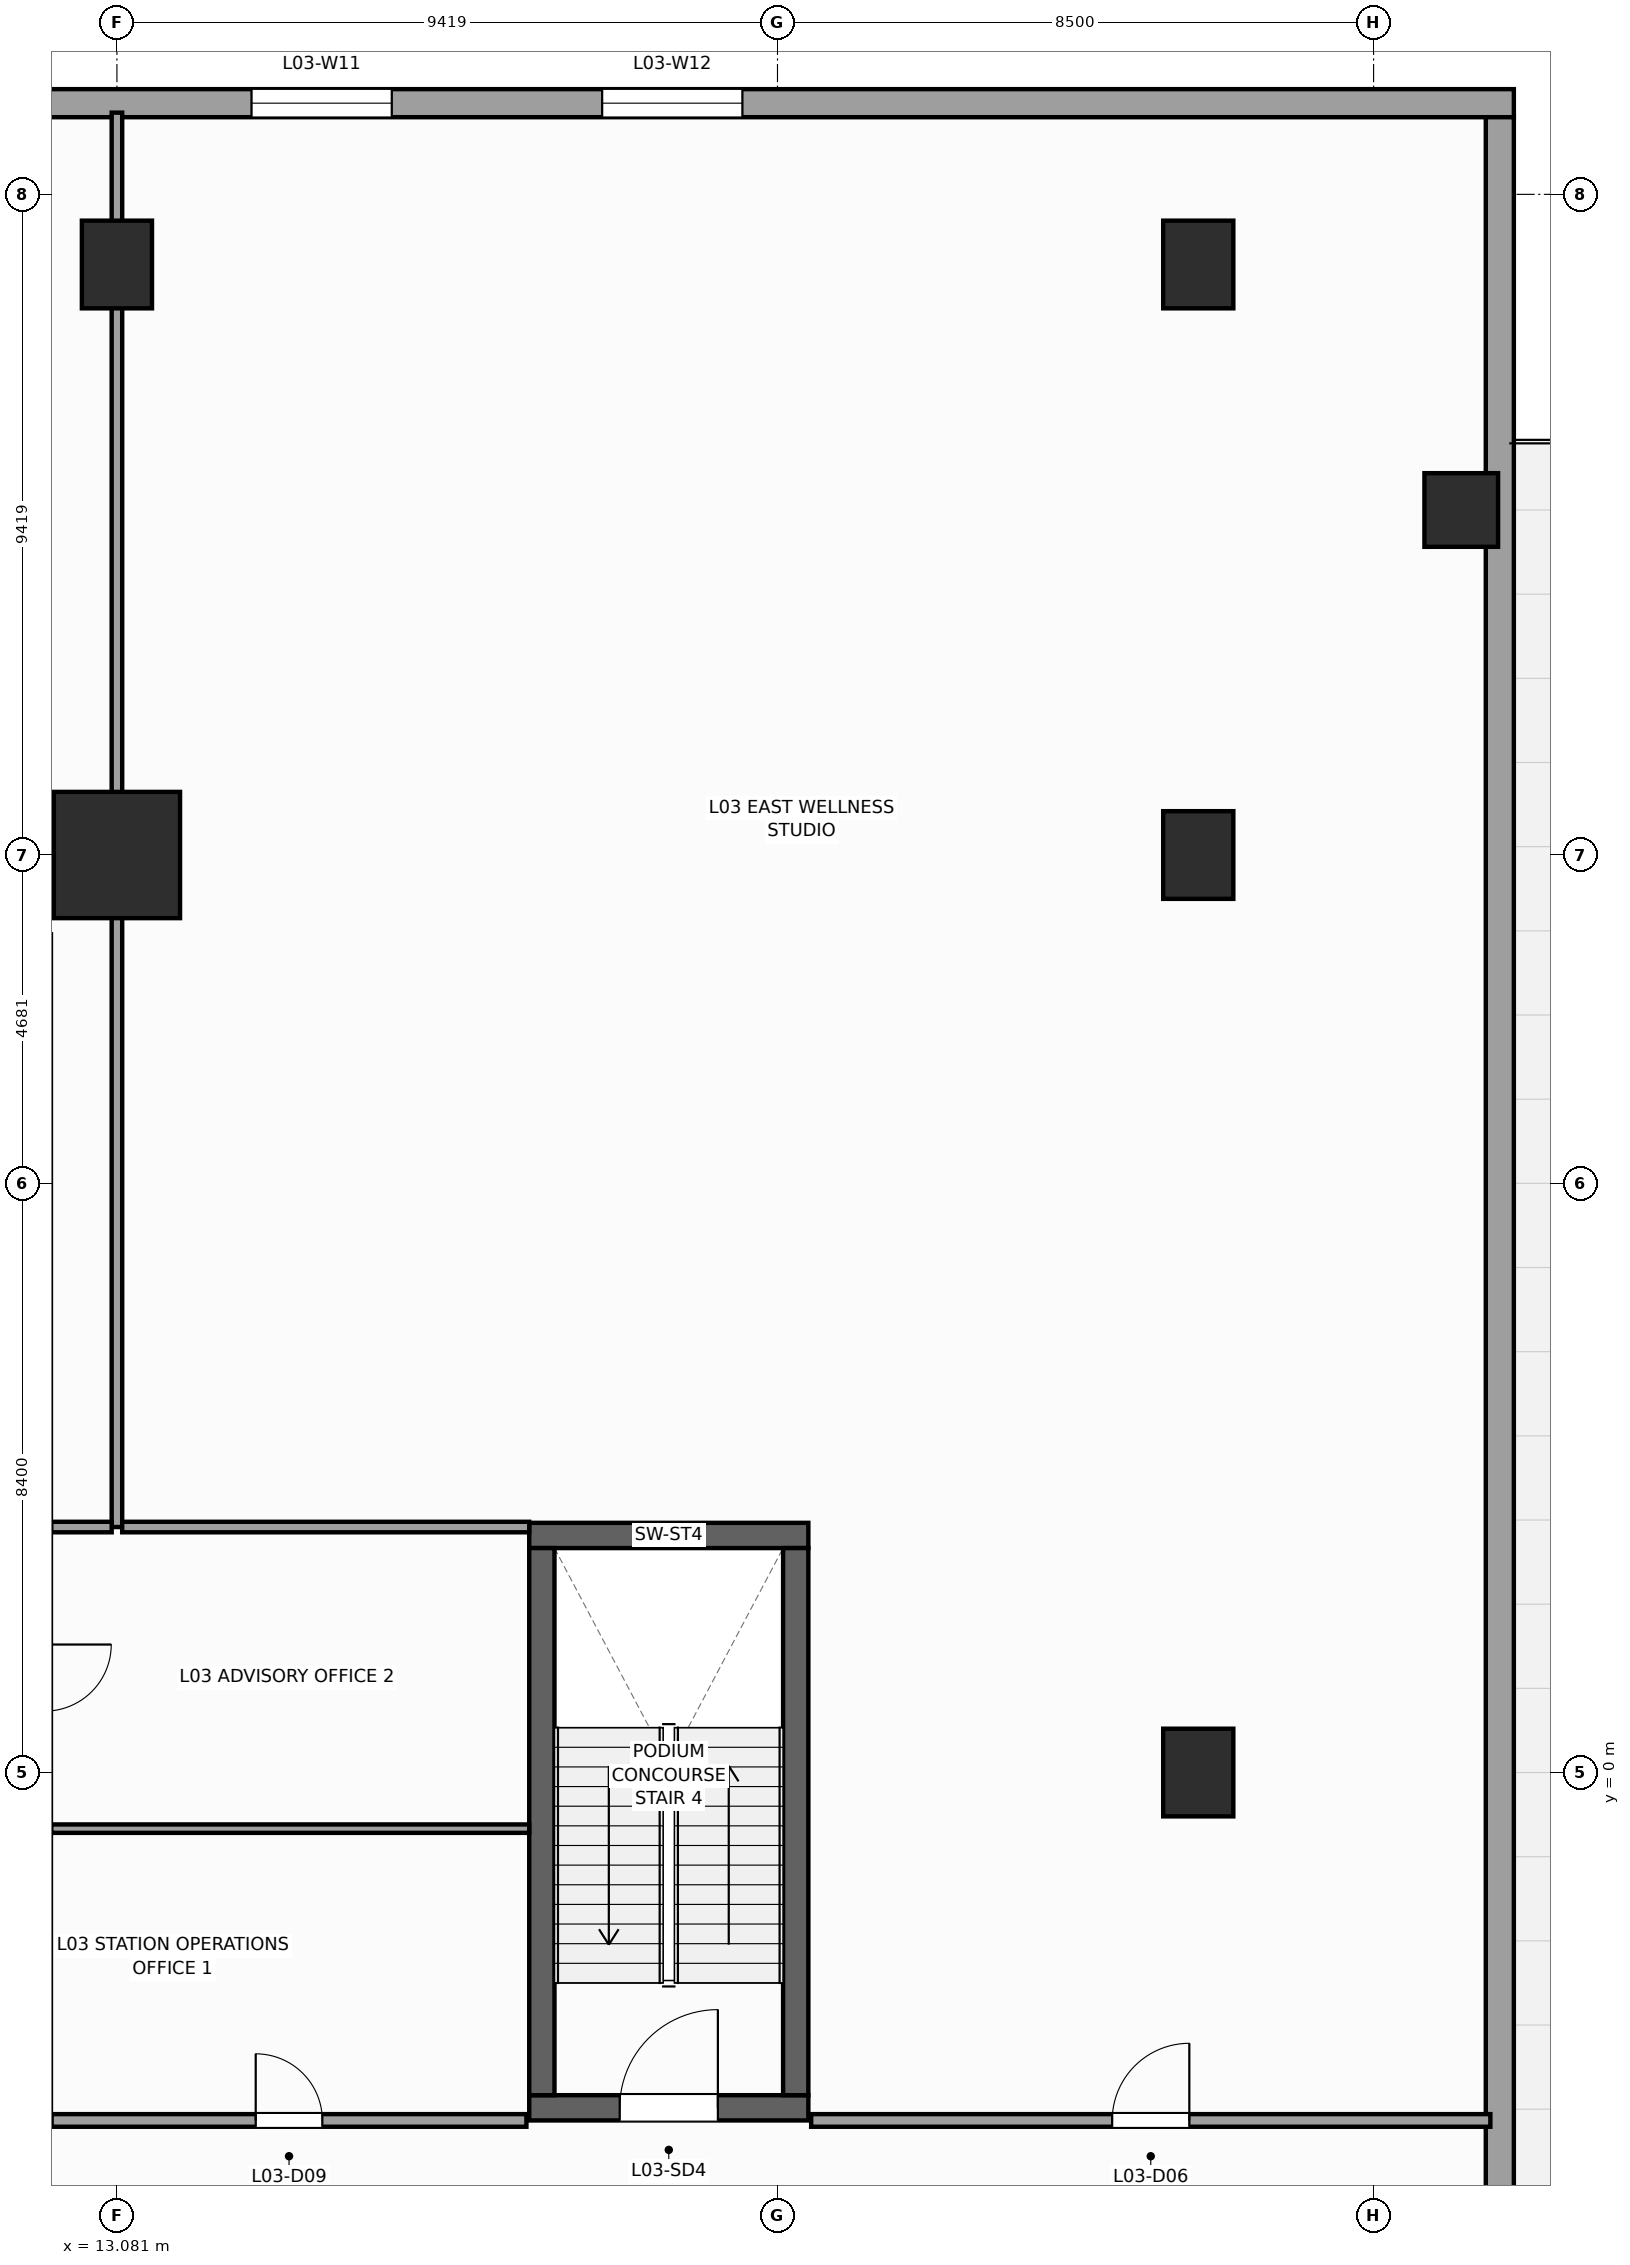
"""IFC4 building model, lengths in metres.
Left out: names, types, materials, properties, quantities, classifications, styles, units other than length and angle.
Written with IfcOpenShell. Run it as: python <this file> out.ifc"""

import sys

from ifc_helpers import new_model, si_unit, direction, frame, frame_2d, origin, origin_2d, place, context, subcontext, project, spatial, rectangle, extrude, source, transform, mapped, element, fill, save


model = new_model("IFC4")
c1 = context("Model", 3, precision=1e-05, world=origin(), true_north=direction((0.0, 1.0)))
c2 = subcontext(c1, "Body", "Model", "MODEL_VIEW")
j1 = project(units=[si_unit("LENGTHUNIT", "METRE"), si_unit("PLANEANGLEUNIT", "RADIAN")], contexts=[c1])
p1 = place(None, origin())
s1 = spatial("IfcSite", under=j1, at=p1, CompositionType="ELEMENT")
p2 = place(p1, origin())
s2 = spatial("IfcBuilding", under=s1, at=p2, CompositionType="ELEMENT")
p3 = place(p2, frame((0.0, 0.0, 16.0)))
s3 = spatial("IfcBuildingStorey", under=s2, at=p3, CompositionType="ELEMENT", Elevation=16.0)
p4 = place(p3, frame((18.96, -4.78, 0.0), z_axis=(0.0, 0.0, 1.0), x_axis=(1.0, 0.0, 0.0)))
e1 = element("IfcWall", 1, at=p4, inside=s3, PredefinedType="SHEAR", context=c2, shape_type="SweptSolid", body=[
    extrude(rectangle(XDim=3.98, YDim=0.36, at=frame_2d((1.99, 0.0))), origin(), (0.0, 0.0, 1.0), 5.0),
])
p5 = place(p4, frame((1.29, 0.0, 0.0)))
e2 = element("IfcOpeningElement", 2, at=p5, cuts=e1, PredefinedType="OPENING", context=c2, shape_type="SweptSolid", body=[
    extrude(rectangle(XDim=1.4, YDim=2.2, at=frame_2d((0.7, 1.1))), frame((0.0, 0.19, 0.0), z_axis=(0.0, -1.0, 0.0), x_axis=(1.0, 0.0, 0.0)), (0.0, 0.0, 1.0), 0.38),
])
p6 = place(p3, frame((18.96, 3.38, 0.0), z_axis=(0.0, 0.0, 1.0), x_axis=(1.0, 0.0, 0.0)))
e3 = element("IfcWall", 3, at=p6, inside=s3, PredefinedType="SHEAR", context=c2, shape_type="SweptSolid", body=[
    extrude(rectangle(XDim=3.98, YDim=0.36, at=frame_2d((1.99, 0.0))), origin(), (0.0, 0.0, 1.0), 5.0),
])
for number, where, z_axis, x_axis in (
    (4, (19.14, -4.6, 0.0), (0.0, 0.0, 1.0), (0.0, 1.0, 0.0)),
    (5, (22.76, -4.6, 0.0), (0.0, 0.0, 1.0), (0.0, 1.0, 0.0)),
):
    element("IfcWall", number, at=place(p3, frame(where, z_axis=z_axis, x_axis=x_axis)), inside=s3, PredefinedType="SHEAR", context=c2, shape_type="SweptSolid", body=[
        extrude(rectangle(XDim=7.8, YDim=0.36, at=frame_2d((3.9, 0.0))), origin(), (0.0, 0.0, 1.0), 5.0),
    ])
m1 = source(origin(), c2, "Body", "SweptSolid", [
    extrude(rectangle(XDim=1.8, YDim=1.8, at=origin_2d()), origin(), (0.0, 0.0, 1.0), 5.0),
])
p7 = place(p3, frame((13.081, 13.081, 0.0), z_axis=(0.0, 0.0, 1.0), x_axis=(1.0, 0.0, 0.0)))
e6 = element("IfcColumn", 6, at=p7, inside=s3, PredefinedType="COLUMN", context=c2, shape_type="MappedRepresentation", body=[
    mapped(m1, transform((0.0, 0.0, 0.0), scale=1.0)),
])
m2 = source(origin(), c2, "Body", "SweptSolid", [
    extrude(rectangle(XDim=1.0, YDim=1.25, at=origin_2d()), origin(), (0.0, 0.0, 1.0), 5.0),
])
for number, where, z_axis, x_axis in (
    (7, (13.081, 21.5, 0.0), (0.0, 0.0, 1.0), (1.0, 0.0, 0.0)),
    (8, (28.5, 21.5, 0.0), (0.0, 0.0, 1.0), (1.0, 0.0, 0.0)),
    (9, (28.5, 0.0, 0.0), (0.0, 0.0, 1.0), (1.0, 0.0, 0.0)),
    (10, (28.5, 13.081, 0.0), (0.0, 0.0, 1.0), (1.0, 0.0, 0.0)),
):
    element("IfcColumn", number, at=place(p3, frame(where, z_axis=z_axis, x_axis=x_axis)), inside=s3, PredefinedType="COLUMN", context=c2, shape_type="MappedRepresentation", body=[
        mapped(m2, transform((0.0, 0.0, 0.0), scale=1.0)),
    ])
m3 = source(origin(), c2, "Body", "SweptSolid", [
    extrude(rectangle(XDim=1.05, YDim=1.05, at=origin_2d()), origin(), (0.0, 0.0, 1.0), 5.0),
])
p8 = place(p3, frame((32.25, 18.0, 0.0), z_axis=(0.0, 0.0, 1.0), x_axis=(1.0, 0.0, 0.0)))
e11 = element("IfcColumn", 11, at=p8, inside=s3, PredefinedType="COLUMN", context=c2, shape_type="MappedRepresentation", body=[
    mapped(m3, transform((0.0, 0.0, 0.0), scale=1.0)),
])
p9 = place(p3, frame((1.5, 23.8, 0.0), z_axis=(0.0, 0.0, 1.0), x_axis=(1.0, 0.0, 0.0)))
e12 = element("IfcWall", 12, at=p9, inside=s3, PredefinedType="STANDARD", context=c2, shape_type="SweptSolid", body=[
    extrude(rectangle(XDim=31.5, YDim=0.4, at=frame_2d((15.75, 0.0))), origin(), (0.0, 0.0, 1.0), 4.66),
])
p10 = place(p9, frame((8.0, 0.0, 0.85)))
e13 = element("IfcOpeningElement", 13, at=p10, cuts=e12, PredefinedType="OPENING", context=c2, shape_type="SweptSolid", body=[
    extrude(rectangle(XDim=2.0, YDim=2.8, at=frame_2d((1.0, 1.4))), frame((0.0, 0.21, 0.0), z_axis=(0.0, -1.0, 0.0), x_axis=(1.0, 0.0, 0.0)), (0.0, 0.0, 1.0), 0.42),
])
p11 = place(p9, frame((13.5, 0.0, 0.85)))
e14 = element("IfcOpeningElement", 14, at=p11, cuts=e12, PredefinedType="OPENING", context=c2, shape_type="SweptSolid", body=[
    extrude(rectangle(XDim=2.0, YDim=2.8, at=frame_2d((1.0, 1.4))), frame((0.0, 0.21, 0.0), z_axis=(0.0, -1.0, 0.0), x_axis=(1.0, 0.0, 0.0)), (0.0, 0.0, 1.0), 0.42),
])
p12 = place(p9, frame((18.5, 0.0, 0.85)))
e15 = element("IfcOpeningElement", 15, at=p12, cuts=e12, PredefinedType="OPENING", context=c2, shape_type="SweptSolid", body=[
    extrude(rectangle(XDim=2.0, YDim=2.8, at=frame_2d((1.0, 1.4))), frame((0.0, 0.21, 0.0), z_axis=(0.0, -1.0, 0.0), x_axis=(1.0, 0.0, 0.0)), (0.0, 0.0, 1.0), 0.42),
])
p13 = place(p3, frame((32.8, -23.6, 0.0), z_axis=(0.0, 0.0, 1.0), x_axis=(0.0, 1.0, 0.0)))
e16 = element("IfcWall", 16, at=p13, inside=s3, PredefinedType="STANDARD", context=c2, shape_type="SweptSolid", body=[
    extrude(rectangle(XDim=47.2, YDim=0.4, at=frame_2d((23.6, 0.0))), origin(), (0.0, 0.0, 1.0), 4.66),
])
p14 = place(p13, frame((14.5, 0.0, 0.0)))
e17 = element("IfcOpeningElement", 17, at=p14, cuts=e16, PredefinedType="OPENING", context=c2, shape_type="SweptSolid", body=[
    extrude(rectangle(XDim=1.2, YDim=2.3, at=frame_2d((0.6, 1.15))), frame((0.0, 0.21, 0.0), z_axis=(0.0, -1.0, 0.0), x_axis=(1.0, 0.0, 0.0)), (0.0, 0.0, 1.0), 0.42),
])
p15 = place(p3, frame((12.15, -4.96, 0.0), z_axis=(0.0, 0.0, 1.0), x_axis=(1.0, 0.0, 0.0)))
e18 = element("IfcWall", 18, at=p15, inside=s3, PredefinedType="PARTITIONING", context=c2, shape_type="SweptSolid", body=[
    extrude(rectangle(XDim=6.77, YDim=0.18, at=frame_2d((3.385, 0.0))), origin(), (0.0, 0.0, 1.0), 4.66),
])
p16 = place(p15, frame((2.91, 0.0, 0.0)))
e19 = element("IfcOpeningElement", 19, at=p16, cuts=e18, PredefinedType="OPENING", context=c2, shape_type="SweptSolid", body=[
    extrude(rectangle(XDim=0.95, YDim=2.15, at=frame_2d((0.475, 1.075))), frame((0.0, 0.1, 0.0), z_axis=(0.0, -1.0, 0.0), x_axis=(1.0, 0.0, 0.0)), (0.0, 0.0, 1.0), 0.2),
])
p17 = place(p3, frame((22.98, -4.96, 0.0), z_axis=(0.0, 0.0, 1.0), x_axis=(1.0, 0.0, 0.0)))
e20 = element("IfcWall", 20, at=p17, inside=s3, PredefinedType="PARTITIONING", context=c2, shape_type="SweptSolid", body=[
    extrude(rectangle(XDim=9.685, YDim=0.18, at=frame_2d((4.843, 0.0))), origin(), (0.0, 0.0, 1.0), 4.66),
])
p18 = place(p17, frame((4.292, 0.0, 0.0)))
e21 = element("IfcOpeningElement", 21, at=p18, cuts=e20, PredefinedType="OPENING", context=c2, shape_type="SweptSolid", body=[
    extrude(rectangle(XDim=1.1, YDim=2.2, at=frame_2d((0.55, 1.1))), frame((0.0, 0.1, 0.0), z_axis=(0.0, -1.0, 0.0), x_axis=(1.0, 0.0, 0.0)), (0.0, 0.0, 1.0), 0.2),
])
p19 = place(p3, frame((13.081, 3.5, 0.0), z_axis=(0.0, 0.0, 1.0), x_axis=(0.0, 1.0, 0.0)))
e22 = element("IfcWall", 22, at=p19, inside=s3, PredefinedType="PARTITIONING", context=c2, shape_type="SweptSolid", body=[
    extrude(rectangle(XDim=20.165, YDim=0.15, at=frame_2d((10.083, 0.0))), origin(), (0.0, 0.0, 1.0), 3.652),
])
p20 = place(p3, frame((12.145, 3.5, 0.0), z_axis=(0.0, 0.0, 1.0), x_axis=(1.0, 0.0, 0.0)))
e23 = element("IfcWall", 23, at=p20, inside=s3, PredefinedType="PARTITIONING", context=c2, shape_type="SweptSolid", body=[
    extrude(rectangle(XDim=0.861, YDim=0.15, at=frame_2d((0.431, 0.0))), origin(), (0.0, 0.0, 1.0), 4.66),
])
p21 = place(p3, frame((13.156, 3.5, 0.0), z_axis=(0.0, 0.0, 1.0), x_axis=(1.0, 0.0, 0.0)))
e24 = element("IfcWall", 24, at=p21, inside=s3, PredefinedType="PARTITIONING", context=c2, shape_type="SweptSolid", body=[
    extrude(rectangle(XDim=5.804, YDim=0.15, at=frame_2d((2.902, 0.0))), origin(), (0.0, 0.0, 1.0), 4.66),
])
p22 = place(p3, frame((12.145, -0.8, 0.0), z_axis=(0.0, 0.0, 1.0), x_axis=(1.0, 0.0, 0.0)))
e25 = element("IfcWall", 25, at=p22, inside=s3, PredefinedType="PARTITIONING", context=c2, shape_type="SweptSolid", body=[
    extrude(rectangle(XDim=6.815, YDim=0.12, at=frame_2d((3.407, 0.0))), origin(), (0.0, 0.0, 1.0), 4.66),
])
m4 = source(origin(), c2, "Body", "SweptSolid", [
    extrude(rectangle(XDim=2.0, YDim=2.8, at=frame_2d((1.0, 1.4))), frame((0.0, 0.03, 0.0), z_axis=(0.0, -1.0, 0.0), x_axis=(1.0, 0.0, 0.0)), (0.0, 0.0, 1.0), 0.06),
])
p23 = place(p11, origin())
e26 = element("IfcWindow", 26, at=p23, inside=s3, PartitioningType="SINGLE_PANEL", PredefinedType="WINDOW", context=c2, shape_type="MappedRepresentation", body=[
    mapped(m4, transform((0.0, 0.0, 0.0), scale=1.0)),
])
fill(e14, e26)
p24 = place(p12, origin())
e27 = element("IfcWindow", 27, at=p24, inside=s3, PartitioningType="SINGLE_PANEL", PredefinedType="WINDOW", context=c2, shape_type="MappedRepresentation", body=[
    mapped(m4, transform((0.0, 0.0, 0.0), scale=1.0)),
])
fill(e15, e27)
m5 = source(origin(), c2, "Body", "SweptSolid", [
    extrude(rectangle(XDim=1.4, YDim=2.2, at=frame_2d((0.7, 1.1))), frame((0.0, 0.025, 0.0), z_axis=(0.0, -1.0, 0.0), x_axis=(1.0, 0.0, 0.0)), (0.0, 0.0, 1.0), 0.05),
])
p25 = place(p5, origin())
e28 = element("IfcDoor", 28, at=p25, inside=s3, OperationType="SINGLE_SWING_RIGHT", PredefinedType="DOOR", context=c2, shape_type="MappedRepresentation", body=[
    mapped(m5, transform((0.0, 0.0, 0.0), scale=1.0)),
])
fill(e2, e28)
m6 = source(origin(), c2, "Body", "SweptSolid", [
    extrude(rectangle(XDim=1.1, YDim=2.2, at=frame_2d((0.55, 1.1))), frame((0.0, 0.025, 0.0), z_axis=(0.0, -1.0, 0.0), x_axis=(1.0, 0.0, 0.0)), (0.0, 0.0, 1.0), 0.05),
])
p26 = place(p18, origin())
e29 = element("IfcDoor", 29, at=p26, inside=s3, OperationType="SINGLE_SWING_RIGHT", PredefinedType="DOOR", context=c2, shape_type="MappedRepresentation", body=[
    mapped(m6, transform((0.0, 0.0, 0.0), scale=1.0)),
])
fill(e21, e29)
m7 = source(origin(), c2, "Body", "SweptSolid", [
    extrude(rectangle(XDim=0.95, YDim=2.15, at=frame_2d((0.475, 1.075))), frame((0.0, 0.025, 0.0), z_axis=(0.0, -1.0, 0.0), x_axis=(1.0, 0.0, 0.0)), (0.0, 0.0, 1.0), 0.05),
])
p27 = place(p16, origin())
e30 = element("IfcDoor", 30, at=p27, inside=s3, OperationType="SINGLE_SWING_LEFT", PredefinedType="DOOR", context=c2, shape_type="MappedRepresentation", body=[
    mapped(m7, transform((0.0, 0.0, 0.0), scale=1.0)),
])
fill(e19, e30)
save(model, sys.argv[1])
